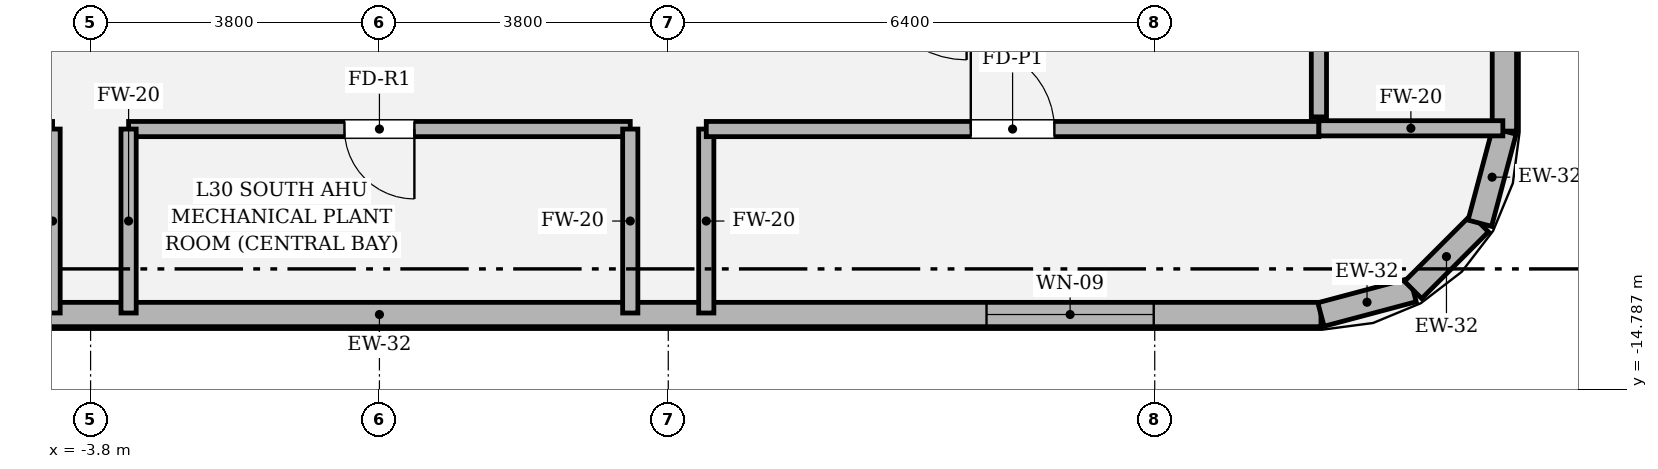
"""IFC4 building model, lengths in metres.
Left out: names, types, materials, properties, quantities, classifications, styles, units other than length and angle.
Written with IfcOpenShell. Run it as: python <this file> out.ifc"""

import sys

from ifc_helpers import new_model, si_unit, direction, frame, frame_2d, origin, place, context, subcontext, project, spatial, rectangle, extrude, element, fill, save


model = new_model("IFC4")
c1 = context("Model", 3, precision=1e-05, world=origin(), true_north=direction((0.0, 1.0)))
c2 = subcontext(c1, "Body", "Model", "MODEL_VIEW")
j1 = project(units=[si_unit("LENGTHUNIT", "METRE"), si_unit("PLANEANGLEUNIT", "RADIAN")], contexts=[c1])
p1 = place(None, origin())
s1 = spatial("IfcSite", under=j1, at=p1, CompositionType="ELEMENT")
p2 = place(p1, origin())
s2 = spatial("IfcBuilding", under=s1, at=p2, CompositionType="ELEMENT")
p3 = place(p2, frame((0.0, 0.0, 130.2)))
s3 = spatial("IfcBuildingStorey", under=s2, at=p3, CompositionType="ELEMENT", Elevation=130.2)
p4 = place(p3, frame((-12.387, -13.8, 0.0), z_axis=(0.0, 0.0, 1.0), x_axis=(1.0, 0.0, 0.0)))
e1 = element("IfcWall", 1, at=p4, inside=s3, PredefinedType="SOLIDWALL", context=c2, shape_type="SweptSolid", body=[
    extrude(rectangle(XDim=24.774, YDim=0.32, at=frame_2d((12.387, 0.0))), origin(), (0.0, 0.0, 1.0), 3.834),
])
p5 = place(p4, frame((2.2, 0.0, 0.9)))
e2 = element("IfcOpeningElement", 2, at=p5, cuts=e1, PredefinedType="OPENING", context=c2, shape_type="SweptSolid", body=[
    extrude(rectangle(XDim=2.2, YDim=1.2, at=frame_2d((1.1, 0.6))), frame((0.0, 0.17, 0.0), z_axis=(0.0, -1.0, 0.0), x_axis=(1.0, 0.0, 0.0)), (0.0, 0.0, 1.0), 0.34),
])
p6 = place(p4, frame((20.374, 0.0, 0.9)))
e3 = element("IfcOpeningElement", 3, at=p6, cuts=e1, PredefinedType="OPENING", context=c2, shape_type="SweptSolid", body=[
    extrude(rectangle(XDim=2.2, YDim=1.2, at=frame_2d((1.1, 0.6))), frame((0.0, 0.17, 0.0), z_axis=(0.0, -1.0, 0.0), x_axis=(1.0, 0.0, 0.0)), (0.0, 0.0, 1.0), 0.34),
])
p7 = place(p3, frame((12.387, -13.8, 0.0), z_axis=(0.0, 0.0, 1.0), x_axis=(0.966283375382, 0.25748094776, 0.0)))
e4 = element("IfcWall", 4, at=p7, inside=s3, PredefinedType="SOLIDWALL", context=c2, shape_type="SweptSolid", body=[
    extrude(rectangle(XDim=1.254, YDim=0.32, at=frame_2d((0.627, 0.0))), origin(), (0.0, 0.0, 1.0), 3.984),
])
p8 = place(p3, frame((13.599, -13.477, 0.0), z_axis=(0.0, 0.0, 1.0), x_axis=(0.707106781187, 0.707106781187, 0.0)))
e5 = element("IfcWall", 5, at=p8, inside=s3, PredefinedType="SOLIDWALL", context=c2, shape_type="SweptSolid", body=[
    extrude(rectangle(XDim=1.242, YDim=0.32, at=frame_2d((0.621, 0.0))), origin(), (0.0, 0.0, 1.0), 3.984),
])
p9 = place(p3, frame((14.477, -12.599, 0.0), z_axis=(0.0, 0.0, 1.0), x_axis=(0.25748094776, 0.966283375382, 0.0)))
e6 = element("IfcWall", 6, at=p9, inside=s3, PredefinedType="SOLIDWALL", context=c2, shape_type="SweptSolid", body=[
    extrude(rectangle(XDim=1.254, YDim=0.32, at=frame_2d((0.627, 0.0))), origin(), (0.0, 0.0, 1.0), 3.984),
])
p10 = place(p3, frame((14.8, -11.387, 0.0), z_axis=(0.0, 0.0, 1.0), x_axis=(0.0, 1.0, 0.0)))
e7 = element("IfcWall", 7, at=p10, inside=s3, PredefinedType="SOLIDWALL", context=c2, shape_type="SweptSolid", body=[
    extrude(rectangle(XDim=22.774, YDim=0.32, at=frame_2d((11.387, 0.0))), origin(), (0.0, 0.0, 1.0), 3.834),
])
p11 = place(p10, frame((2.2, 0.0, 0.9)))
e8 = element("IfcOpeningElement", 8, at=p11, cuts=e7, PredefinedType="OPENING", context=c2, shape_type="SweptSolid", body=[
    extrude(rectangle(XDim=2.2, YDim=1.2, at=frame_2d((1.1, 0.6))), frame((0.0, 0.17, 0.0), z_axis=(0.0, -1.0, 0.0), x_axis=(1.0, 0.0, 0.0)), (0.0, 0.0, 1.0), 0.34),
])
p12 = place(p10, frame((18.374, 0.0, 0.9)))
e9 = element("IfcOpeningElement", 9, at=p12, cuts=e7, PredefinedType="OPENING", context=c2, shape_type="SweptSolid", body=[
    extrude(rectangle(XDim=2.2, YDim=1.2, at=frame_2d((1.1, 0.6))), frame((0.0, 0.17, 0.0), z_axis=(0.0, -1.0, 0.0), x_axis=(1.0, 0.0, 0.0)), (0.0, 0.0, 1.0), 0.34),
])
p13 = place(p3, frame((-4.3, -11.36, 0.0), z_axis=(0.0, 0.0, 1.0), x_axis=(0.0, -1.0, 0.0)))
e10 = element("IfcWall", 10, at=p13, inside=s3, PredefinedType="SOLIDWALL", context=c2, shape_type="SweptSolid", body=[
    extrude(rectangle(XDim=2.42, YDim=0.2, at=frame_2d((1.21, 0.0))), origin(), (0.0, 0.0, 1.0), 3.984),
])
p14 = place(p3, frame((-3.3, -11.36, 0.0), z_axis=(0.0, 0.0, 1.0), x_axis=(1.0, 0.0, 0.0)))
e11 = element("IfcWall", 11, at=p14, inside=s3, PredefinedType="SOLIDWALL", context=c2, shape_type="SweptSolid", body=[
    extrude(rectangle(XDim=6.6, YDim=0.2, at=frame_2d((3.3, 0.0))), origin(), (0.0, 0.0, 1.0), 4.54),
])
p15 = place(p14, frame((2.84, 0.0, 0.0)))
e12 = element("IfcOpeningElement", 12, at=p15, cuts=e11, PredefinedType="OPENING", context=c2, shape_type="SweptSolid", body=[
    extrude(rectangle(XDim=0.92, YDim=2.1, at=frame_2d((0.46, 1.05))), frame((0.0, 0.11, 0.0), z_axis=(0.0, -1.0, 0.0), x_axis=(1.0, 0.0, 0.0)), (0.0, 0.0, 1.0), 0.22),
])
for number, where, z_axis, x_axis in (
    (13, (3.3, -11.36, 0.0), (0.0, 0.0, 1.0), (0.0, -1.0, 0.0)),
    (14, (-3.3, -13.78, 0.0), (0.0, 0.0, 1.0), (0.0, 1.0, 0.0)),
    (15, (4.3, -13.78, 0.0), (0.0, 0.0, 1.0), (0.0, 1.0, 0.0)),
):
    element("IfcWall", number, at=place(p3, frame(where, z_axis=z_axis, x_axis=x_axis)), inside=s3, PredefinedType="SOLIDWALL", context=c2, shape_type="SweptSolid", body=[
        extrude(rectangle(XDim=2.42, YDim=0.2, at=frame_2d((1.21, 0.0))), origin(), (0.0, 0.0, 1.0), 3.984),
    ])
p16 = place(p3, frame((4.3, -11.36, 0.0), z_axis=(0.0, 0.0, 1.0), x_axis=(1.0, 0.0, 0.0)))
e16 = element("IfcWall", 16, at=p16, inside=s3, PredefinedType="SOLIDWALL", context=c2, shape_type="SweptSolid", body=[
    extrude(rectangle(XDim=8.06, YDim=0.2, at=frame_2d((4.03, 0.0))), origin(), (0.0, 0.0, 1.0), 4.54),
])
p17 = place(p16, frame((3.48, 0.0, 0.0)))
e17 = element("IfcOpeningElement", 17, at=p17, cuts=e16, PredefinedType="OPENING", context=c2, shape_type="SweptSolid", body=[
    extrude(rectangle(XDim=1.1, YDim=2.2, at=frame_2d((0.55, 1.1))), frame((0.0, 0.11, 0.0), z_axis=(0.0, -1.0, 0.0), x_axis=(1.0, 0.0, 0.0)), (0.0, 0.0, 1.0), 0.22),
])
p18 = place(p3, frame((12.36, -11.35, 0.0), z_axis=(0.0, 0.0, 1.0), x_axis=(1.0, 0.0, 0.0)))
e18 = element("IfcWall", 18, at=p18, inside=s3, PredefinedType="SOLIDWALL", context=c2, shape_type="SweptSolid", body=[
    extrude(rectangle(XDim=2.42, YDim=0.2, at=frame_2d((1.21, 0.0))), origin(), (0.0, 0.0, 1.0), 3.984),
])
p19 = place(p3, frame((12.36, -11.2, 0.0), z_axis=(0.0, 0.0, 1.0), x_axis=(0.0, 1.0, 0.0)))
e19 = element("IfcWall", 19, at=p19, inside=s3, PredefinedType="SOLIDWALL", context=c2, shape_type="SweptSolid", body=[
    extrude(rectangle(XDim=7.3, YDim=0.2, at=frame_2d((3.65, 0.0))), origin(), (0.0, 0.0, 1.0), 4.54),
])
p20 = place(p19, frame((3.1, 0.0, 0.0)))
e20 = element("IfcOpeningElement", 20, at=p20, cuts=e19, PredefinedType="OPENING", context=c2, shape_type="SweptSolid", body=[
    extrude(rectangle(XDim=1.1, YDim=2.2, at=frame_2d((0.55, 1.1))), frame((0.0, 0.11, 0.0), z_axis=(0.0, -1.0, 0.0), x_axis=(1.0, 0.0, 0.0)), (0.0, 0.0, 1.0), 0.22),
])
p21 = place(p6, origin())
e21 = element("IfcWindow", 21, at=p21, inside=s3, PartitioningType="SINGLE_PANEL", PredefinedType="WINDOW", context=c2, shape_type="SweptSolid", body=[
    extrude(rectangle(XDim=2.2, YDim=1.2, at=frame_2d((1.1, 0.6))), frame((0.0, 0.03, 0.0), z_axis=(0.0, -1.0, 0.0), x_axis=(1.0, 0.0, 0.0)), (0.0, 0.0, 1.0), 0.06),
])
fill(e3, e21)
p22 = place(p15, origin())
e22 = element("IfcDoor", 22, at=p22, inside=s3, OperationType="SINGLE_SWING_RIGHT", PredefinedType="DOOR", context=c2, shape_type="SweptSolid", body=[
    extrude(rectangle(XDim=0.92, YDim=2.1, at=frame_2d((0.46, 1.05))), frame((0.0, 0.025, 0.0), z_axis=(0.0, -1.0, 0.0), x_axis=(1.0, 0.0, 0.0)), (0.0, 0.0, 1.0), 0.05),
])
fill(e12, e22)
p23 = place(p17, origin())
e23 = element("IfcDoor", 23, at=p23, inside=s3, OperationType="SINGLE_SWING_LEFT", PredefinedType="DOOR", context=c2, shape_type="SweptSolid", body=[
    extrude(rectangle(XDim=1.1, YDim=2.2, at=frame_2d((0.55, 1.1))), frame((0.0, 0.025, 0.0), z_axis=(0.0, -1.0, 0.0), x_axis=(1.0, 0.0, 0.0)), (0.0, 0.0, 1.0), 0.05),
])
fill(e17, e23)
save(model, sys.argv[1])
